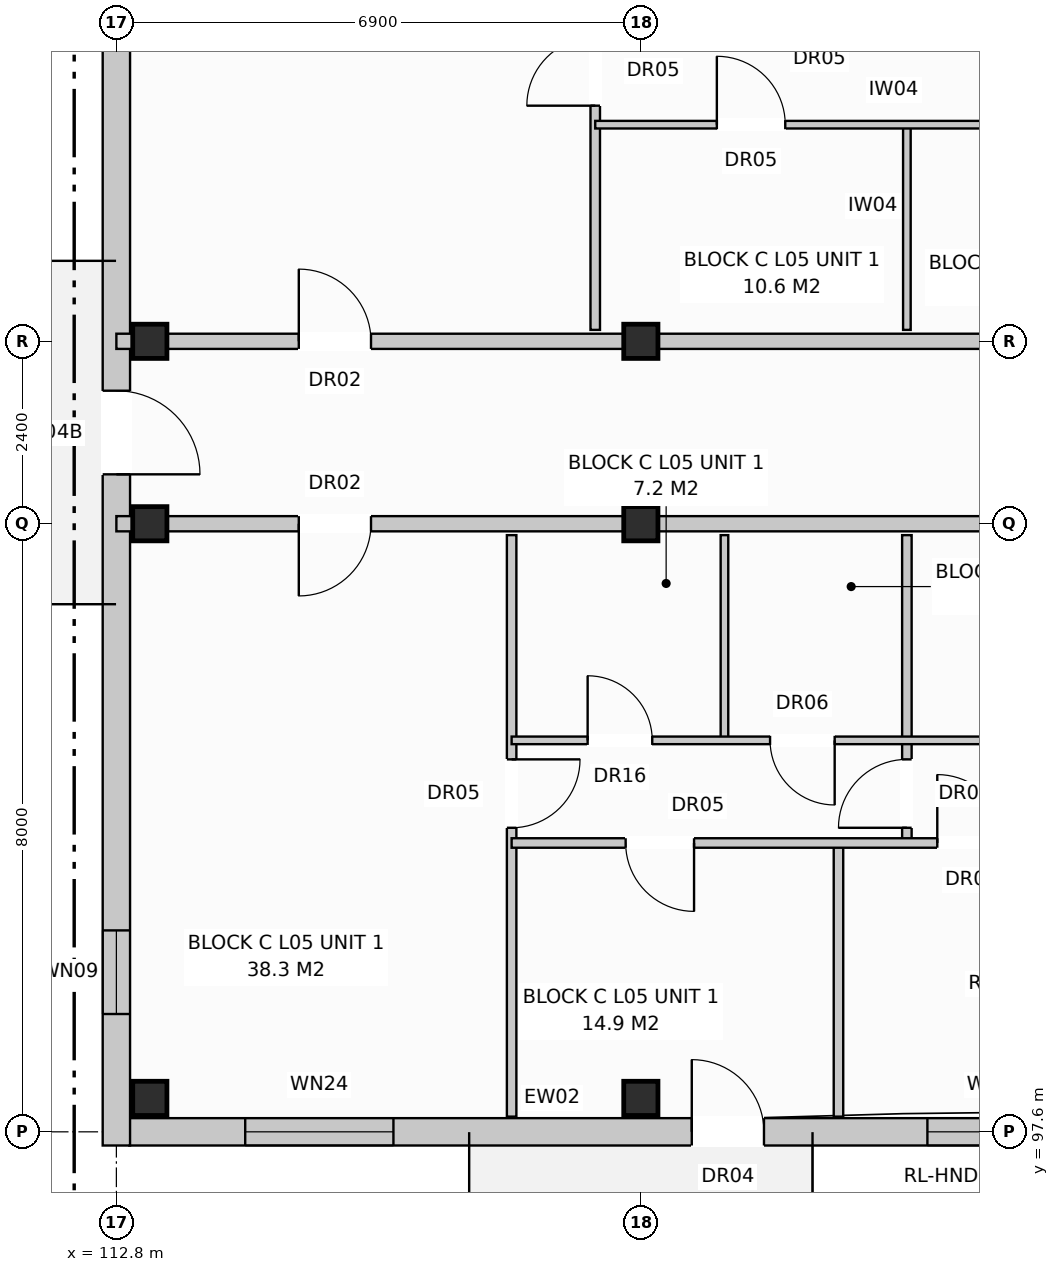
"""IFC4 building model, lengths in metres.
Left out: names, types, materials, properties, quantities, classifications, styles, units other than length and angle.
Written with IfcOpenShell. Run it as: python <this file> out.ifc"""

import sys

from ifc_helpers import new_model, si_unit, direction, frame, frame_2d, origin, origin_with_axes, origin_2d, place, context, subcontext, project, spatial, rectangle, extrude, element, fill, save


model = new_model("IFC4")
c1 = context("Model", 3, precision=1e-05, world=origin(), true_north=direction((0.0, 1.0)))
c2 = subcontext(c1, "Body", "Model", "MODEL_VIEW")
j1 = project(units=[si_unit("LENGTHUNIT", "METRE"), si_unit("PLANEANGLEUNIT", "RADIAN")], contexts=[c1])
p1 = place(None, origin())
s1 = spatial("IfcSite", under=j1, at=p1, CompositionType="ELEMENT")
p2 = place(p1, origin())
s2 = spatial("IfcBuilding", under=s1, at=p2, CompositionType="ELEMENT")
p3 = place(p2, frame((0.0, 0.0, 17.6)))
s3 = spatial("IfcBuildingStorey", under=s2, at=p3, CompositionType="ELEMENT", Elevation=17.6)
for number, where, z_axis, x_axis in (
    (1, (113.24, 98.04, 0.0), (0.0, 0.0, 1.0), (1.0, 0.0, 0.0)),
    (2, (113.24, 105.6, 0.0), (0.0, 0.0, 1.0), (1.0, 0.0, 0.0)),
    (3, (113.24, 108.0, 0.0), (0.0, 0.0, 1.0), (1.0, 0.0, 0.0)),
    (4, (119.7, 98.04, 0.0), (0.0, 0.0, 1.0), (1.0, 0.0, 0.0)),
    (5, (119.7, 105.6, 0.0), (0.0, 0.0, 1.0), (1.0, 0.0, 0.0)),
    (6, (119.7, 108.0, 0.0), (0.0, 0.0, 1.0), (1.0, 0.0, 0.0)),
):
    element("IfcColumn", number, at=place(p3, frame(where, z_axis=z_axis, x_axis=x_axis)), inside=s3, PredefinedType="COLUMN", context=c2, shape_type="SweptSolid", body=[
        extrude(rectangle(XDim=0.45, YDim=0.45, at=origin_2d()), origin(), (0.0, 0.0, 1.0), 3.2),
    ])
p4 = place(p3, frame((112.97, 97.6, 0.0), z_axis=(0.0, 0.0, 1.0), x_axis=(1.0, 0.0, 0.0)))
e7 = element("IfcWall", 7, at=p4, inside=s3, PredefinedType="STANDARD", context=c2, shape_type="SweptSolid", body=[
    extrude(rectangle(XDim=14.08, YDim=0.36, at=frame_2d((7.04, 0.0))), origin(), (0.0, 0.0, 1.0), 2.95),
])
p5 = place(p4, frame((7.4, 0.0, 0.0)))
e8 = element("IfcOpeningElement", 8, at=p5, cuts=e7, PredefinedType="OPENING", context=c2, shape_type="SweptSolid", body=[
    extrude(rectangle(XDim=0.95, YDim=2.1, at=frame_2d((0.475, 1.05))), frame((0.0, 0.192, 0.0), z_axis=(0.0, -1.0, 0.0), x_axis=(1.0, 0.0, 0.0)), (0.0, 0.0, 1.0), 0.384),
])
p6 = place(p4, frame((1.525, 0.0, 0.8)))
e9 = element("IfcOpeningElement", 9, at=p6, cuts=e7, PredefinedType="OPENING", context=c2, shape_type="SweptSolid", body=[
    extrude(rectangle(XDim=1.95, YDim=1.65, at=frame_2d((0.975, 0.825))), frame((0.0, 0.192, 0.0), z_axis=(0.0, -1.0, 0.0), x_axis=(1.0, 0.0, 0.0)), (0.0, 0.0, 1.0), 0.384),
])
p7 = place(p4, frame((10.5, 0.0, 0.8)))
e10 = element("IfcOpeningElement", 10, at=p7, cuts=e7, PredefinedType="OPENING", context=c2, shape_type="SweptSolid", body=[
    extrude(rectangle(XDim=1.8, YDim=1.7, at=frame_2d((0.9, 0.85))), frame((0.0, 0.192, 0.0), z_axis=(0.0, -1.0, 0.0), x_axis=(1.0, 0.0, 0.0)), (0.0, 0.0, 1.0), 0.384),
])
p8 = place(p3, frame((112.8, 97.42, 0.0), z_axis=(0.0, 0.0, 1.0), x_axis=(0.0, 1.0, 0.0)))
e11 = element("IfcWall", 11, at=p8, inside=s3, PredefinedType="STANDARD", context=c2, shape_type="SweptSolid", body=[
    extrude(rectangle(XDim=18.76, YDim=0.36, at=frame_2d((9.38, 0.0))), origin(), (0.0, 0.0, 1.0), 2.95),
])
p9 = place(p8, frame((8.83, 0.0, 0.0)))
e12 = element("IfcOpeningElement", 12, at=p9, cuts=e11, PredefinedType="OPENING", context=c2, shape_type="SweptSolid", body=[
    extrude(rectangle(XDim=1.1, YDim=2.1, at=frame_2d((0.55, 1.05))), frame((0.0, 0.192, 0.0), z_axis=(0.0, -1.0, 0.0), x_axis=(1.0, 0.0, 0.0)), (0.0, 0.0, 1.0), 0.384),
])
p10 = place(p8, frame((1.73, 0.0, 0.72)))
e13 = element("IfcOpeningElement", 13, at=p10, cuts=e11, PredefinedType="OPENING", context=c2, shape_type="SweptSolid", body=[
    extrude(rectangle(XDim=1.1, YDim=1.5, at=frame_2d((0.55, 0.75))), frame((0.0, 0.192, 0.0), z_axis=(0.0, -1.0, 0.0), x_axis=(1.0, 0.0, 0.0)), (0.0, 0.0, 1.0), 0.384),
])
p11 = place(p8, frame((15.93, 0.0, 0.72)))
e14 = element("IfcOpeningElement", 14, at=p11, cuts=e11, PredefinedType="OPENING", context=c2, shape_type="SweptSolid", body=[
    extrude(rectangle(XDim=1.1, YDim=1.5, at=frame_2d((0.55, 0.75))), frame((0.0, 0.192, 0.0), z_axis=(0.0, -1.0, 0.0), x_axis=(1.0, 0.0, 0.0)), (0.0, 0.0, 1.0), 0.384),
])
p12 = place(p3, frame((112.8, 108.0, 0.0), z_axis=(0.0, 0.0, 1.0), x_axis=(1.0, 0.0, 0.0)))
e15 = element("IfcWall", 15, at=p12, inside=s3, PredefinedType="PARTITIONING", context=c2, shape_type="SweptSolid", body=[
    extrude(rectangle(XDim=20.7, YDim=0.2, at=frame_2d((10.35, 0.0))), origin(), (0.0, 0.0, 1.0), 2.39),
])
p13 = place(p12, frame((2.4, 0.0, 0.0)))
e16 = element("IfcOpeningElement", 16, at=p13, cuts=e15, PredefinedType="OPENING", context=c2, shape_type="SweptSolid", body=[
    extrude(rectangle(XDim=0.95, YDim=2.15, at=frame_2d((0.475, 1.075))), frame((0.0, 0.112, 0.0), z_axis=(0.0, -1.0, 0.0), x_axis=(1.0, 0.0, 0.0)), (0.0, 0.0, 1.0), 0.224),
])
p14 = place(p3, frame((119.1, 108.15, 0.0), z_axis=(0.0, 0.0, 1.0), x_axis=(0.0, 1.0, 0.0)))
e17 = element("IfcWall", 17, at=p14, inside=s3, PredefinedType="PARTITIONING", context=c2, shape_type="SweptSolid", body=[
    extrude(rectangle(XDim=7.65, YDim=0.125, at=frame_2d((3.825, 0.0))), origin(), (0.0, 0.0, 1.0), 2.95),
])
p15 = place(p14, frame((2.95, 0.0, 0.0)))
e18 = element("IfcOpeningElement", 18, at=p15, cuts=e17, PredefinedType="OPENING", context=c2, shape_type="SweptSolid", body=[
    extrude(rectangle(XDim=0.9, YDim=2.1, at=frame_2d((0.45, 1.05))), frame((0.0, 0.074, 0.0), z_axis=(0.0, -1.0, 0.0), x_axis=(1.0, 0.0, 0.0)), (0.0, 0.0, 1.0), 0.149),
])
p16 = place(p3, frame((123.2, 108.15, 0.0), z_axis=(0.0, 0.0, 1.0), x_axis=(0.0, 1.0, 0.0)))
e19 = element("IfcWall", 19, at=p16, inside=s3, PredefinedType="PARTITIONING", context=c2, shape_type="SweptSolid", body=[
    extrude(rectangle(XDim=2.7, YDim=0.1, at=frame_2d((1.35, 0.0))), origin(), (0.0, 0.0, 1.0), 2.95),
])
p17 = place(p3, frame((119.1, 110.85, 0.0), z_axis=(0.0, 0.0, 1.0), x_axis=(1.0, 0.0, 0.0)))
e20 = element("IfcWall", 20, at=p17, inside=s3, PredefinedType="PARTITIONING", context=c2, shape_type="SweptSolid", body=[
    extrude(rectangle(XDim=14.3, YDim=0.1, at=frame_2d((7.15, 0.0))), origin(), (0.0, 0.0, 1.0), 2.95),
])
p18 = place(p17, frame((1.6, 0.0, 0.0)))
e21 = element("IfcOpeningElement", 21, at=p18, cuts=e20, PredefinedType="OPENING", context=c2, shape_type="SweptSolid", body=[
    extrude(rectangle(XDim=0.9, YDim=2.1, at=frame_2d((0.45, 1.05))), frame((0.0, 0.062, 0.0), z_axis=(0.0, -1.0, 0.0), x_axis=(1.0, 0.0, 0.0)), (0.0, 0.0, 1.0), 0.124),
])
p19 = place(p17, frame((5.1, 0.0, 0.0)))
e22 = element("IfcOpeningElement", 22, at=p19, cuts=e20, PredefinedType="OPENING", context=c2, shape_type="SweptSolid", body=[
    extrude(rectangle(XDim=0.85, YDim=2.05, at=frame_2d((0.425, 1.025))), frame((0.0, 0.062, 0.0), z_axis=(0.0, -1.0, 0.0), x_axis=(1.0, 0.0, 0.0)), (0.0, 0.0, 1.0), 0.124),
])
p20 = place(p17, frame((8.2, 0.0, 0.0)))
e23 = element("IfcOpeningElement", 23, at=p20, cuts=e20, PredefinedType="OPENING", context=c2, shape_type="SweptSolid", body=[
    extrude(rectangle(XDim=0.85, YDim=2.05, at=frame_2d((0.425, 1.025))), frame((0.0, 0.062, 0.0), z_axis=(0.0, -1.0, 0.0), x_axis=(1.0, 0.0, 0.0)), (0.0, 0.0, 1.0), 0.124),
])
p21 = place(p17, frame((11.6, 0.0, 0.0)))
e24 = element("IfcOpeningElement", 24, at=p21, cuts=e20, PredefinedType="OPENING", context=c2, shape_type="SweptSolid", body=[
    extrude(rectangle(XDim=0.85, YDim=2.05, at=frame_2d((0.425, 1.025))), frame((0.0, 0.062, 0.0), z_axis=(0.0, -1.0, 0.0), x_axis=(1.0, 0.0, 0.0)), (0.0, 0.0, 1.0), 0.124),
])
p22 = place(p3, frame((112.8, 105.6, 0.0), z_axis=(0.0, 0.0, 1.0), x_axis=(1.0, 0.0, 0.0)))
e25 = element("IfcWall", 25, at=p22, inside=s3, PredefinedType="PARTITIONING", context=c2, shape_type="SweptSolid", body=[
    extrude(rectangle(XDim=13.8, YDim=0.2, at=frame_2d((6.9, 0.0))), origin(), (0.0, 0.0, 1.0), 2.39),
])
p23 = place(p22, frame((2.4, 0.0, 0.0)))
e26 = element("IfcOpeningElement", 26, at=p23, cuts=e25, PredefinedType="OPENING", context=c2, shape_type="SweptSolid", body=[
    extrude(rectangle(XDim=0.95, YDim=2.15, at=frame_2d((0.475, 1.075))), frame((0.0, 0.112, 0.0), z_axis=(0.0, -1.0, 0.0), x_axis=(1.0, 0.0, 0.0)), (0.0, 0.0, 1.0), 0.224),
])
p24 = place(p3, frame((118.0, 105.45, 0.0), z_axis=(0.0, 0.0, 1.0), x_axis=(0.0, -1.0, 0.0)))
e27 = element("IfcWall", 27, at=p24, inside=s3, PredefinedType="PARTITIONING", context=c2, shape_type="SweptSolid", body=[
    extrude(rectangle(XDim=7.65, YDim=0.125, at=frame_2d((3.825, 0.0))), origin(), (0.0, 0.0, 1.0), 2.95),
])
p25 = place(p24, frame((2.95, 0.0, 0.0)))
e28 = element("IfcOpeningElement", 28, at=p25, cuts=e27, PredefinedType="OPENING", context=c2, shape_type="SweptSolid", body=[
    extrude(rectangle(XDim=0.9, YDim=2.1, at=frame_2d((0.45, 1.05))), frame((0.0, 0.074, 0.0), z_axis=(0.0, -1.0, 0.0), x_axis=(1.0, 0.0, 0.0)), (0.0, 0.0, 1.0), 0.149),
])
p26 = place(p3, frame((120.8, 105.45, 0.0), z_axis=(0.0, 0.0, 1.0), x_axis=(0.0, -1.0, 0.0)))
e29 = element("IfcWall", 29, at=p26, inside=s3, PredefinedType="PARTITIONING", context=c2, shape_type="SweptSolid", body=[
    extrude(rectangle(XDim=2.7, YDim=0.1, at=frame_2d((1.35, 0.0))), origin(), (0.0, 0.0, 1.0), 2.59),
])
p27 = place(p3, frame((123.2, 105.45, 0.0), z_axis=(0.0, 0.0, 1.0), x_axis=(0.0, -1.0, 0.0)))
e30 = element("IfcWall", 30, at=p27, inside=s3, PredefinedType="PARTITIONING", context=c2, shape_type="SweptSolid", body=[
    extrude(rectangle(XDim=4.05, YDim=0.125, at=frame_2d((2.025, 0.0))), origin(), (0.0, 0.0, 1.0), 2.95),
])
p28 = place(p27, frame((2.95, 0.0, 0.0)))
e31 = element("IfcOpeningElement", 31, at=p28, cuts=e30, PredefinedType="OPENING", context=c2, shape_type="SweptSolid", body=[
    extrude(rectangle(XDim=0.9, YDim=2.1, at=frame_2d((0.45, 1.05))), frame((0.0, 0.074, 0.0), z_axis=(0.0, -1.0, 0.0), x_axis=(1.0, 0.0, 0.0)), (0.0, 0.0, 1.0), 0.149),
])
p29 = place(p3, frame((122.3, 101.4, 0.0), z_axis=(0.0, 0.0, 1.0), x_axis=(0.0, -1.0, 0.0)))
e32 = element("IfcWall", 32, at=p29, inside=s3, PredefinedType="PARTITIONING", context=c2, shape_type="SweptSolid", body=[
    extrude(rectangle(XDim=3.6, YDim=0.125, at=frame_2d((1.8, 0.0))), origin(), (0.0, 0.0, 1.0), 2.95),
])
p30 = place(p3, frame((118.0, 102.75, 0.0), z_axis=(0.0, 0.0, 1.0), x_axis=(1.0, 0.0, 0.0)))
e33 = element("IfcWall", 33, at=p30, inside=s3, PredefinedType="PARTITIONING", context=c2, shape_type="SweptSolid", body=[
    extrude(rectangle(XDim=8.5, YDim=0.1, at=frame_2d((4.25, 0.0))), origin(), (0.0, 0.0, 1.0), 2.95),
])
p31 = place(p30, frame((1.0, 0.0, 0.0)))
e34 = element("IfcOpeningElement", 34, at=p31, cuts=e33, PredefinedType="OPENING", context=c2, shape_type="SweptSolid", body=[
    extrude(rectangle(XDim=0.85, YDim=2.1, at=frame_2d((0.425, 1.05))), frame((0.0, 0.062, 0.0), z_axis=(0.0, -1.0, 0.0), x_axis=(1.0, 0.0, 0.0)), (0.0, 0.0, 1.0), 0.124),
])
p32 = place(p30, frame((3.4, 0.0, 0.0)))
e35 = element("IfcOpeningElement", 35, at=p32, cuts=e33, PredefinedType="OPENING", context=c2, shape_type="SweptSolid", body=[
    extrude(rectangle(XDim=0.85, YDim=2.05, at=frame_2d((0.425, 1.025))), frame((0.0, 0.062, 0.0), z_axis=(0.0, -1.0, 0.0), x_axis=(1.0, 0.0, 0.0)), (0.0, 0.0, 1.0), 0.124),
])
p33 = place(p30, frame((6.2, 0.0, 0.0)))
e36 = element("IfcOpeningElement", 36, at=p33, cuts=e33, PredefinedType="OPENING", context=c2, shape_type="SweptSolid", body=[
    extrude(rectangle(XDim=0.85, YDim=2.05, at=frame_2d((0.425, 1.025))), frame((0.0, 0.062, 0.0), z_axis=(0.0, -1.0, 0.0), x_axis=(1.0, 0.0, 0.0)), (0.0, 0.0, 1.0), 0.124),
])
p34 = place(p3, frame((118.0, 101.4, 0.0), z_axis=(0.0, 0.0, 1.0), x_axis=(1.0, 0.0, 0.0)))
e37 = element("IfcWall", 37, at=p34, inside=s3, PredefinedType="PARTITIONING", context=c2, shape_type="SweptSolid", body=[
    extrude(rectangle(XDim=8.5, YDim=0.125, at=frame_2d((4.25, 0.0))), origin(), (0.0, 0.0, 1.0), 2.95),
])
p35 = place(p34, frame((1.5, 0.0, 0.0)))
e38 = element("IfcOpeningElement", 38, at=p35, cuts=e37, PredefinedType="OPENING", context=c2, shape_type="SweptSolid", body=[
    extrude(rectangle(XDim=0.9, YDim=2.1, at=frame_2d((0.45, 1.05))), frame((0.0, 0.074, 0.0), z_axis=(0.0, -1.0, 0.0), x_axis=(1.0, 0.0, 0.0)), (0.0, 0.0, 1.0), 0.149),
])
p36 = place(p34, frame((5.6, 0.0, 0.0)))
e39 = element("IfcOpeningElement", 39, at=p36, cuts=e37, PredefinedType="OPENING", context=c2, shape_type="SweptSolid", body=[
    extrude(rectangle(XDim=0.9, YDim=2.1, at=frame_2d((0.45, 1.05))), frame((0.0, 0.074, 0.0), z_axis=(0.0, -1.0, 0.0), x_axis=(1.0, 0.0, 0.0)), (0.0, 0.0, 1.0), 0.149),
])
p37 = place(p5, origin_with_axes())
e40 = element("IfcDoor", 40, at=p37, inside=s3, OperationType="SINGLE_SWING_LEFT", PredefinedType="DOOR", context=c2, shape_type="SweptSolid", body=[
    extrude(rectangle(XDim=0.95, YDim=2.1, at=frame_2d((0.475, 1.05))), frame((0.0, 0.025, 0.0), z_axis=(0.0, -1.0, 0.0), x_axis=(1.0, 0.0, 0.0)), (0.0, 0.0, 1.0), 0.05),
])
fill(e8, e40)
p38 = place(p6, origin_with_axes())
e41 = element("IfcWindow", 41, at=p38, inside=s3, PartitioningType="SINGLE_PANEL", PredefinedType="WINDOW", context=c2, shape_type="SweptSolid", body=[
    extrude(rectangle(XDim=1.95, YDim=1.65, at=frame_2d((0.975, 0.825))), frame((0.0, 0.03, 0.0), z_axis=(0.0, -1.0, 0.0), x_axis=(1.0, 0.0, 0.0)), (0.0, 0.0, 1.0), 0.06),
])
fill(e9, e41)
p39 = place(p7, origin_with_axes())
e42 = element("IfcWindow", 42, at=p39, inside=s3, PartitioningType="SINGLE_PANEL", PredefinedType="WINDOW", context=c2, shape_type="SweptSolid", body=[
    extrude(rectangle(XDim=1.8, YDim=1.7, at=frame_2d((0.9, 0.85))), frame((0.0, 0.03, 0.0), z_axis=(0.0, -1.0, 0.0), x_axis=(1.0, 0.0, 0.0)), (0.0, 0.0, 1.0), 0.06),
])
fill(e10, e42)
p40 = place(p9, frame((1.1, 0.0, 0.0), z_axis=(0.0, 0.0, 1.0), x_axis=(-1.0, 0.0, 0.0)))
e43 = element("IfcDoor", 43, at=p40, inside=s3, OperationType="SINGLE_SWING_LEFT", PredefinedType="DOOR", context=c2, shape_type="SweptSolid", body=[
    extrude(rectangle(XDim=1.1, YDim=2.1, at=frame_2d((0.55, 1.05))), frame((0.0, 0.025, 0.0), z_axis=(0.0, -1.0, 0.0), x_axis=(1.0, 0.0, 0.0)), (0.0, 0.0, 1.0), 0.05),
])
fill(e12, e43)
p41 = place(p10, origin_with_axes())
e44 = element("IfcWindow", 44, at=p41, inside=s3, PartitioningType="SINGLE_PANEL", PredefinedType="WINDOW", context=c2, shape_type="SweptSolid", body=[
    extrude(rectangle(XDim=1.1, YDim=1.5, at=frame_2d((0.55, 0.75))), frame((0.0, 0.03, 0.0), z_axis=(0.0, -1.0, 0.0), x_axis=(1.0, 0.0, 0.0)), (0.0, 0.0, 1.0), 0.06),
])
fill(e13, e44)
p42 = place(p13, origin_with_axes())
e45 = element("IfcDoor", 45, at=p42, inside=s3, OperationType="SINGLE_SWING_LEFT", PredefinedType="DOOR", context=c2, shape_type="SweptSolid", body=[
    extrude(rectangle(XDim=0.95, YDim=2.15, at=frame_2d((0.475, 1.075))), frame((0.0, 0.025, 0.0), z_axis=(0.0, -1.0, 0.0), x_axis=(1.0, 0.0, 0.0)), (0.0, 0.0, 1.0), 0.05),
])
fill(e16, e45)
p43 = place(p15, origin_with_axes())
e46 = element("IfcDoor", 46, at=p43, inside=s3, OperationType="SINGLE_SWING_LEFT", PredefinedType="DOOR", context=c2, shape_type="SweptSolid", body=[
    extrude(rectangle(XDim=0.9, YDim=2.1, at=frame_2d((0.45, 1.05))), frame((0.0, 0.025, 0.0), z_axis=(0.0, -1.0, 0.0), x_axis=(1.0, 0.0, 0.0)), (0.0, 0.0, 1.0), 0.05),
])
fill(e18, e46)
p44 = place(p18, origin_with_axes())
e47 = element("IfcDoor", 47, at=p44, inside=s3, OperationType="SINGLE_SWING_LEFT", PredefinedType="DOOR", context=c2, shape_type="SweptSolid", body=[
    extrude(rectangle(XDim=0.9, YDim=2.1, at=frame_2d((0.45, 1.05))), frame((0.0, 0.025, 0.0), z_axis=(0.0, -1.0, 0.0), x_axis=(1.0, 0.0, 0.0)), (0.0, 0.0, 1.0), 0.05),
])
fill(e21, e47)
p45 = place(p23, frame((0.95, 0.0, 0.0), z_axis=(0.0, 0.0, 1.0), x_axis=(-1.0, 0.0, 0.0)))
e48 = element("IfcDoor", 48, at=p45, inside=s3, OperationType="SINGLE_SWING_LEFT", PredefinedType="DOOR", context=c2, shape_type="SweptSolid", body=[
    extrude(rectangle(XDim=0.95, YDim=2.15, at=frame_2d((0.475, 1.075))), frame((0.0, 0.025, 0.0), z_axis=(0.0, -1.0, 0.0), x_axis=(1.0, 0.0, 0.0)), (0.0, 0.0, 1.0), 0.05),
])
fill(e26, e48)
p46 = place(p25, origin_with_axes())
e49 = element("IfcDoor", 49, at=p46, inside=s3, OperationType="SINGLE_SWING_LEFT", PredefinedType="DOOR", context=c2, shape_type="SweptSolid", body=[
    extrude(rectangle(XDim=0.9, YDim=2.1, at=frame_2d((0.45, 1.05))), frame((0.0, 0.025, 0.0), z_axis=(0.0, -1.0, 0.0), x_axis=(1.0, 0.0, 0.0)), (0.0, 0.0, 1.0), 0.05),
])
fill(e28, e49)
p47 = place(p28, frame((0.9, 0.0, 0.0), z_axis=(0.0, 0.0, 1.0), x_axis=(-1.0, 0.0, 0.0)))
e50 = element("IfcDoor", 50, at=p47, inside=s3, OperationType="SINGLE_SWING_RIGHT", PredefinedType="DOOR", context=c2, shape_type="SweptSolid", body=[
    extrude(rectangle(XDim=0.9, YDim=2.1, at=frame_2d((0.45, 1.05))), frame((0.0, 0.025, 0.0), z_axis=(0.0, -1.0, 0.0), x_axis=(1.0, 0.0, 0.0)), (0.0, 0.0, 1.0), 0.05),
])
fill(e31, e50)
p48 = place(p31, origin_with_axes())
e51 = element("IfcDoor", 51, at=p48, inside=s3, OperationType="SINGLE_SWING_LEFT", PredefinedType="DOOR", context=c2, shape_type="SweptSolid", body=[
    extrude(rectangle(XDim=0.85, YDim=2.1, at=frame_2d((0.425, 1.05))), frame((0.0, 0.025, 0.0), z_axis=(0.0, -1.0, 0.0), x_axis=(1.0, 0.0, 0.0)), (0.0, 0.0, 1.0), 0.05),
])
fill(e34, e51)
p49 = place(p32, frame((0.85, 0.0, 0.0), z_axis=(0.0, 0.0, 1.0), x_axis=(-1.0, 0.0, 0.0)))
e52 = element("IfcDoor", 52, at=p49, inside=s3, OperationType="SINGLE_SWING_RIGHT", PredefinedType="DOOR", context=c2, shape_type="SweptSolid", body=[
    extrude(rectangle(XDim=0.85, YDim=2.05, at=frame_2d((0.425, 1.025))), frame((0.0, 0.025, 0.0), z_axis=(0.0, -1.0, 0.0), x_axis=(1.0, 0.0, 0.0)), (0.0, 0.0, 1.0), 0.05),
])
fill(e35, e52)
p50 = place(p35, frame((0.9, 0.0, 0.0), z_axis=(0.0, 0.0, 1.0), x_axis=(-1.0, 0.0, 0.0)))
e53 = element("IfcDoor", 53, at=p50, inside=s3, OperationType="SINGLE_SWING_RIGHT", PredefinedType="DOOR", context=c2, shape_type="SweptSolid", body=[
    extrude(rectangle(XDim=0.9, YDim=2.1, at=frame_2d((0.45, 1.05))), frame((0.0, 0.025, 0.0), z_axis=(0.0, -1.0, 0.0), x_axis=(1.0, 0.0, 0.0)), (0.0, 0.0, 1.0), 0.05),
])
fill(e38, e53)
p51 = place(p36, origin_with_axes())
e54 = element("IfcDoor", 54, at=p51, inside=s3, OperationType="SINGLE_SWING_LEFT", PredefinedType="DOOR", context=c2, shape_type="SweptSolid", body=[
    extrude(rectangle(XDim=0.9, YDim=2.1, at=frame_2d((0.45, 1.05))), frame((0.0, 0.025, 0.0), z_axis=(0.0, -1.0, 0.0), x_axis=(1.0, 0.0, 0.0)), (0.0, 0.0, 1.0), 0.05),
])
fill(e39, e54)
save(model, sys.argv[1])
